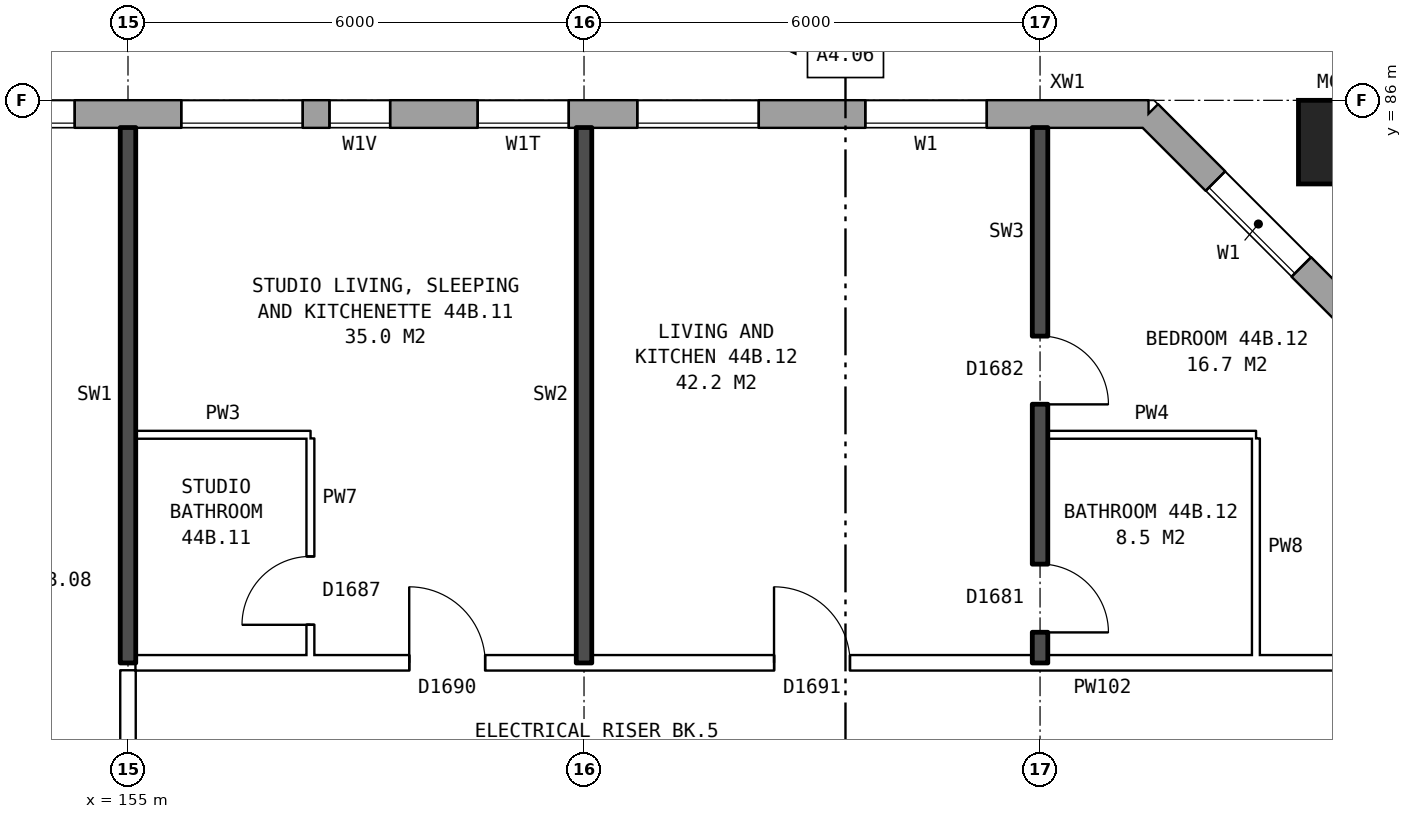
"""IFC4 building model, lengths in metres.
Left out: names, types, materials, properties, quantities, classifications, styles, units other than length and angle.
Written with IfcOpenShell. Run it as: python <this file> out.ifc"""

import sys

from ifc_helpers import new_model, si_unit, direction, frame, frame_2d, origin, origin_2d, place, context, subcontext, project, spatial, rectangle, hollow_rectangle, extrude, element, fill, save


model = new_model("IFC4")
c1 = context("Model", 3, precision=1e-05, world=origin(), true_north=direction((0.0, 1.0)))
c2 = subcontext(c1, "Body", "Model", "MODEL_VIEW")
j1 = project(units=[si_unit("LENGTHUNIT", "METRE"), si_unit("PLANEANGLEUNIT", "RADIAN")], contexts=[c1])
p1 = place(None, origin())
s1 = spatial("IfcSite", under=j1, at=p1, CompositionType="ELEMENT")
p2 = place(p1, origin())
s2 = spatial("IfcBuilding", under=s1, at=p2, CompositionType="ELEMENT")
p3 = place(p2, frame((0.0, 0.0, 157.8)))
s3 = spatial("IfcBuildingStorey", under=s2, at=p3, CompositionType="ELEMENT", Elevation=157.8)
p4 = place(p3, frame((170.95, 85.45, 0.0), z_axis=(0.0, 0.0, 1.0), x_axis=(1.0, 0.0, 0.0)))
e1 = element("IfcColumn", 1, at=p4, inside=s3, PredefinedType="COLUMN", context=c2, shape_type="SweptSolid", body=[
    extrude(hollow_rectangle(XDim=1.1, YDim=1.1, WallThickness=0.06, at=origin_2d()), origin(), (0.0, 0.0, 1.0), 3.1),
])
p5 = place(p3, frame((171.32, 82.925, 0.0), z_axis=(0.0, 0.0, 1.0), x_axis=(-0.707106781187, 0.707106781187, 0.0)))
e2 = element("IfcWall", 2, at=p5, inside=s3, PredefinedType="STANDARD", context=c2, shape_type="SweptSolid", body=[
    extrude(rectangle(XDim=4.094, YDim=0.36, at=frame_2d((2.047, 0.0))), origin(), (0.0, 0.0, 1.0), 2.85),
])
p6 = place(p5, frame((1.247, 0.0, 0.8)))
e3 = element("IfcOpeningElement", 3, at=p6, cuts=e2, PredefinedType="OPENING", context=c2, shape_type="SweptSolid", body=[
    extrude(rectangle(XDim=1.6, YDim=1.8, at=frame_2d((0.8, 0.9))), frame((0.0, 0.19, 0.0), z_axis=(0.0, -1.0, 0.0), x_axis=(1.0, 0.0, 0.0)), (0.0, 0.0, 1.0), 0.38),
])
p7 = place(p3, frame((168.425, 85.82, 0.0), z_axis=(0.0, 0.0, 1.0), x_axis=(-1.0, 0.0, 0.0)))
e4 = element("IfcWall", 4, at=p7, inside=s3, PredefinedType="STANDARD", context=c2, shape_type="SweptSolid", body=[
    extrude(rectangle(XDim=34.351, YDim=0.36, at=frame_2d((17.175, 0.0))), origin(), (0.0, 0.0, 1.0), 2.85),
])
p8 = place(p7, frame((2.125, 0.0, 0.8)))
e5 = element("IfcOpeningElement", 5, at=p8, cuts=e4, PredefinedType="OPENING", context=c2, shape_type="SweptSolid", body=[
    extrude(rectangle(XDim=1.6, YDim=1.8, at=frame_2d((0.8, 0.9))), frame((0.0, 0.19, 0.0), z_axis=(0.0, -1.0, 0.0), x_axis=(1.0, 0.0, 0.0)), (0.0, 0.0, 1.0), 0.38),
])
p9 = place(p7, frame((5.125, 0.0, 0.8)))
e6 = element("IfcOpeningElement", 6, at=p9, cuts=e4, PredefinedType="OPENING", context=c2, shape_type="SweptSolid", body=[
    extrude(rectangle(XDim=1.6, YDim=1.8, at=frame_2d((0.8, 0.9))), frame((0.0, 0.19, 0.0), z_axis=(0.0, -1.0, 0.0), x_axis=(1.0, 0.0, 0.0)), (0.0, 0.0, 1.0), 0.38),
])
p10 = place(p7, frame((7.625, 0.0, 1.7)))
e7 = element("IfcOpeningElement", 7, at=p10, cuts=e4, PredefinedType="OPENING", context=c2, shape_type="SweptSolid", body=[
    extrude(rectangle(XDim=1.2, YDim=0.9, at=frame_2d((0.6, 0.45))), frame((0.0, 0.19, 0.0), z_axis=(0.0, -1.0, 0.0), x_axis=(1.0, 0.0, 0.0)), (0.0, 0.0, 1.0), 0.38),
])
p11 = place(p7, frame((11.125, 0.0, 0.8)))
e8 = element("IfcOpeningElement", 8, at=p11, cuts=e4, PredefinedType="OPENING", context=c2, shape_type="SweptSolid", body=[
    extrude(rectangle(XDim=1.6, YDim=1.8, at=frame_2d((0.8, 0.9))), frame((0.0, 0.19, 0.0), z_axis=(0.0, -1.0, 0.0), x_axis=(1.0, 0.0, 0.0)), (0.0, 0.0, 1.0), 0.38),
])
p12 = place(p7, frame((14.125, 0.0, 0.8)))
e9 = element("IfcOpeningElement", 9, at=p12, cuts=e4, PredefinedType="OPENING", context=c2, shape_type="SweptSolid", body=[
    extrude(rectangle(XDim=1.6, YDim=1.8, at=frame_2d((0.8, 0.9))), frame((0.0, 0.19, 0.0), z_axis=(0.0, -1.0, 0.0), x_axis=(1.0, 0.0, 0.0)), (0.0, 0.0, 1.0), 0.38),
])
p13 = place(p7, frame((17.125, 0.0, 0.8)))
e10 = element("IfcOpeningElement", 10, at=p13, cuts=e4, PredefinedType="OPENING", context=c2, shape_type="SweptSolid", body=[
    extrude(rectangle(XDim=1.6, YDim=1.8, at=frame_2d((0.8, 0.9))), frame((0.0, 0.19, 0.0), z_axis=(0.0, -1.0, 0.0), x_axis=(1.0, 0.0, 0.0)), (0.0, 0.0, 1.0), 0.38),
])
p14 = place(p7, frame((20.125, 0.0, 0.8)))
e11 = element("IfcOpeningElement", 11, at=p14, cuts=e4, PredefinedType="OPENING", context=c2, shape_type="SweptSolid", body=[
    extrude(rectangle(XDim=1.6, YDim=1.8, at=frame_2d((0.8, 0.9))), frame((0.0, 0.19, 0.0), z_axis=(0.0, -1.0, 0.0), x_axis=(1.0, 0.0, 0.0)), (0.0, 0.0, 1.0), 0.38),
])
p15 = place(p7, frame((22.575, 0.0, 0.45)))
e12 = element("IfcOpeningElement", 12, at=p15, cuts=e4, PredefinedType="OPENING", context=c2, shape_type="SweptSolid", body=[
    extrude(rectangle(XDim=1.2, YDim=1.8, at=frame_2d((0.6, 0.9))), frame((0.0, 0.19, 0.0), z_axis=(0.0, -1.0, 0.0), x_axis=(1.0, 0.0, 0.0)), (0.0, 0.0, 1.0), 0.38),
])
p16 = place(p7, frame((25.875, 0.0, 1.4)))
e13 = element("IfcOpeningElement", 13, at=p16, cuts=e4, PredefinedType="OPENING", context=c2, shape_type="SweptSolid", body=[
    extrude(rectangle(XDim=1.0, YDim=1.2, at=frame_2d((0.5, 0.6))), frame((0.0, 0.19, 0.0), z_axis=(0.0, -1.0, 0.0), x_axis=(1.0, 0.0, 0.0)), (0.0, 0.0, 1.0), 0.38),
])
p17 = place(p7, frame((29.125, 0.0, 0.8)))
e14 = element("IfcOpeningElement", 14, at=p17, cuts=e4, PredefinedType="OPENING", context=c2, shape_type="SweptSolid", body=[
    extrude(rectangle(XDim=1.6, YDim=1.8, at=frame_2d((0.8, 0.9))), frame((0.0, 0.19, 0.0), z_axis=(0.0, -1.0, 0.0), x_axis=(1.0, 0.0, 0.0)), (0.0, 0.0, 1.0), 0.38),
])
p18 = place(p7, frame((32.125, 0.0, 0.8)))
e15 = element("IfcOpeningElement", 15, at=p18, cuts=e4, PredefinedType="OPENING", context=c2, shape_type="SweptSolid", body=[
    extrude(rectangle(XDim=1.6, YDim=1.8, at=frame_2d((0.8, 0.9))), frame((0.0, 0.19, 0.0), z_axis=(0.0, -1.0, 0.0), x_axis=(1.0, 0.0, 0.0)), (0.0, 0.0, 1.0), 0.38),
])
p19 = place(p7, frame((9.975, 0.0, 0.8)))
e16 = element("IfcOpeningElement", 16, at=p19, cuts=e4, PredefinedType="OPENING", context=c2, shape_type="SweptSolid", body=[
    extrude(rectangle(XDim=0.8, YDim=0.9, at=frame_2d((0.4, 0.45))), frame((0.0, 0.19, 0.0), z_axis=(0.0, -1.0, 0.0), x_axis=(1.0, 0.0, 0.0)), (0.0, 0.0, 1.0), 0.38),
])
p20 = place(p7, frame((24.075, 0.0, 0.35)))
e17 = element("IfcOpeningElement", 17, at=p20, cuts=e4, PredefinedType="OPENING", context=c2, shape_type="SweptSolid", body=[
    extrude(rectangle(XDim=0.8, YDim=0.9, at=frame_2d((0.4, 0.45))), frame((0.0, 0.19, 0.0), z_axis=(0.0, -1.0, 0.0), x_axis=(1.0, 0.0, 0.0)), (0.0, 0.0, 1.0), 0.38),
])
p21 = place(p7, frame((27.175, 0.0, 0.8)))
e18 = element("IfcOpeningElement", 18, at=p21, cuts=e4, PredefinedType="OPENING", context=c2, shape_type="SweptSolid", body=[
    extrude(rectangle(XDim=1.4, YDim=1.8, at=frame_2d((0.7, 0.9))), frame((0.0, 0.19, 0.0), z_axis=(0.0, -1.0, 0.0), x_axis=(1.0, 0.0, 0.0)), (0.0, 0.0, 1.0), 0.38),
])
p22 = place(p3, frame((155.1, 78.6, 0.0), z_axis=(0.0, 0.0, 1.0), x_axis=(1.0, 0.0, 0.0)))
e19 = element("IfcWall", 19, at=p22, inside=s3, PredefinedType="PARTITIONING", context=c2, shape_type="SweptSolid", body=[
    extrude(rectangle(XDim=16.04, YDim=0.2, at=frame_2d((8.02, 0.0))), origin(), (0.0, 0.0, 1.0), 2.85),
])
p23 = place(p22, frame((3.6, 0.0, 0.0)))
e20 = element("IfcOpeningElement", 20, at=p23, cuts=e19, PredefinedType="OPENING", context=c2, shape_type="SweptSolid", body=[
    extrude(rectangle(XDim=1.0, YDim=2.1, at=frame_2d((0.5, 1.05))), frame((0.0, 0.11, 0.0), z_axis=(0.0, -1.0, 0.0), x_axis=(1.0, 0.0, 0.0)), (0.0, 0.0, 1.0), 0.22),
])
p24 = place(p22, frame((8.4, 0.0, 0.0)))
e21 = element("IfcOpeningElement", 21, at=p24, cuts=e19, PredefinedType="OPENING", context=c2, shape_type="SweptSolid", body=[
    extrude(rectangle(XDim=1.0, YDim=2.1, at=frame_2d((0.5, 1.05))), frame((0.0, 0.11, 0.0), z_axis=(0.0, -1.0, 0.0), x_axis=(1.0, 0.0, 0.0)), (0.0, 0.0, 1.0), 0.22),
])
p25 = place(p3, frame((155.1, 81.6, 0.0), z_axis=(0.0, 0.0, 1.0), x_axis=(1.0, 0.0, 0.0)))
e22 = element("IfcWall", 22, at=p25, inside=s3, PredefinedType="PARTITIONING", context=c2, shape_type="SweptSolid", body=[
    extrude(rectangle(XDim=2.3, YDim=0.1, at=frame_2d((1.15, 0.0))), origin(), (0.0, 0.0, 1.0), 2.85),
])
p26 = place(p3, frame((167.1, 81.6, 0.0), z_axis=(0.0, 0.0, 1.0), x_axis=(1.0, 0.0, 0.0)))
e23 = element("IfcWall", 23, at=p26, inside=s3, PredefinedType="PARTITIONING", context=c2, shape_type="SweptSolid", body=[
    extrude(rectangle(XDim=2.74, YDim=0.1, at=frame_2d((1.37, 0.0))), origin(), (0.0, 0.0, 1.0), 2.85),
])
p27 = place(p3, frame((155.0, 76.3, 0.0), z_axis=(0.0, 0.0, 1.0), x_axis=(0.0, 1.0, 0.0)))
e24 = element("IfcWall", 24, at=p27, inside=s3, PredefinedType="PARTITIONING", context=c2, shape_type="SweptSolid", body=[
    extrude(rectangle(XDim=2.2, YDim=0.2, at=frame_2d((1.1, 0.0))), origin(), (0.0, 0.0, 1.0), 2.85),
])
p28 = place(p3, frame((155.0, 78.6, 0.0), z_axis=(0.0, 0.0, 1.0), x_axis=(0.0, 1.0, 0.0)))
e25 = element("IfcWall", 25, at=p28, inside=s3, PredefinedType="SOLIDWALL", context=c2, shape_type="SweptSolid", body=[
    extrude(rectangle(XDim=7.04, YDim=0.2, at=frame_2d((3.52, 0.0))), origin(), (0.0, 0.0, 1.0), 2.85),
])
p29 = place(p3, frame((157.4, 78.7, 0.0), z_axis=(0.0, 0.0, 1.0), x_axis=(0.0, 1.0, 0.0)))
e26 = element("IfcWall", 26, at=p29, inside=s3, PredefinedType="PARTITIONING", context=c2, shape_type="SweptSolid", body=[
    extrude(rectangle(XDim=2.85, YDim=0.1, at=frame_2d((1.425, 0.0))), origin(), (0.0, 0.0, 1.0), 2.85),
])
p30 = place(p29, frame((0.4, 0.0, 0.0)))
e27 = element("IfcOpeningElement", 27, at=p30, cuts=e26, PredefinedType="OPENING", context=c2, shape_type="SweptSolid", body=[
    extrude(rectangle(XDim=0.9, YDim=2.1, at=frame_2d((0.45, 1.05))), frame((0.0, 0.06, 0.0), z_axis=(0.0, -1.0, 0.0), x_axis=(1.0, 0.0, 0.0)), (0.0, 0.0, 1.0), 0.12),
])
p31 = place(p3, frame((161.0, 78.6, 0.0), z_axis=(0.0, 0.0, 1.0), x_axis=(0.0, 1.0, 0.0)))
e28 = element("IfcWall", 28, at=p31, inside=s3, PredefinedType="SOLIDWALL", context=c2, shape_type="SweptSolid", body=[
    extrude(rectangle(XDim=7.04, YDim=0.2, at=frame_2d((3.52, 0.0))), origin(), (0.0, 0.0, 1.0), 2.85),
])
p32 = place(p3, frame((167.0, 78.6, 0.0), z_axis=(0.0, 0.0, 1.0), x_axis=(0.0, 1.0, 0.0)))
e29 = element("IfcWall", 29, at=p32, inside=s3, PredefinedType="SOLIDWALL", context=c2, shape_type="SweptSolid", body=[
    extrude(rectangle(XDim=7.04, YDim=0.2, at=frame_2d((3.52, 0.0))), origin(), (0.0, 0.0, 1.0), 2.85),
])
p33 = place(p32, frame((3.4, 0.0, 0.0)))
e30 = element("IfcOpeningElement", 30, at=p33, cuts=e29, PredefinedType="OPENING", context=c2, shape_type="SweptSolid", body=[
    extrude(rectangle(XDim=0.9, YDim=2.1, at=frame_2d((0.45, 1.05))), frame((0.0, 0.11, 0.0), z_axis=(0.0, -1.0, 0.0), x_axis=(1.0, 0.0, 0.0)), (0.0, 0.0, 1.0), 0.22),
])
p34 = place(p32, frame((0.4, 0.0, 0.0)))
e31 = element("IfcOpeningElement", 31, at=p34, cuts=e29, PredefinedType="OPENING", context=c2, shape_type="SweptSolid", body=[
    extrude(rectangle(XDim=0.9, YDim=2.1, at=frame_2d((0.45, 1.05))), frame((0.0, 0.11, 0.0), z_axis=(0.0, -1.0, 0.0), x_axis=(1.0, 0.0, 0.0)), (0.0, 0.0, 1.0), 0.22),
])
p35 = place(p3, frame((169.84, 78.7, 0.0), z_axis=(0.0, 0.0, 1.0), x_axis=(0.0, 1.0, 0.0)))
e32 = element("IfcWall", 32, at=p35, inside=s3, PredefinedType="PARTITIONING", context=c2, shape_type="SweptSolid", body=[
    extrude(rectangle(XDim=2.85, YDim=0.1, at=frame_2d((1.425, 0.0))), origin(), (0.0, 0.0, 1.0), 2.85),
])
p36 = place(p6, origin())
e33 = element("IfcWindow", 33, at=p36, inside=s3, PartitioningType="SINGLE_PANEL", PredefinedType="WINDOW", context=c2, shape_type="SweptSolid", body=[
    extrude(rectangle(XDim=1.6, YDim=1.8, at=frame_2d((0.8, 0.9))), frame((0.0, 0.15, 0.0), z_axis=(0.0, -1.0, 0.0), x_axis=(1.0, 0.0, 0.0)), (0.0, 0.0, 1.0), 0.06),
])
fill(e3, e33)
p37 = place(p8, origin())
e34 = element("IfcWindow", 34, at=p37, inside=s3, PartitioningType="SINGLE_PANEL", PredefinedType="WINDOW", context=c2, shape_type="SweptSolid", body=[
    extrude(rectangle(XDim=1.6, YDim=1.8, at=frame_2d((0.8, 0.9))), frame((0.0, 0.15, 0.0), z_axis=(0.0, -1.0, 0.0), x_axis=(1.0, 0.0, 0.0)), (0.0, 0.0, 1.0), 0.06),
])
fill(e5, e34)
p38 = place(p9, origin())
e35 = element("IfcWindow", 35, at=p38, inside=s3, PartitioningType="SINGLE_PANEL", PredefinedType="WINDOW", context=c2, shape_type="SweptSolid", body=[
    extrude(rectangle(XDim=1.6, YDim=1.8, at=frame_2d((0.8, 0.9))), frame((0.0, 0.15, 0.0), z_axis=(0.0, -1.0, 0.0), x_axis=(1.0, 0.0, 0.0)), (0.0, 0.0, 1.0), 0.06),
])
fill(e6, e35)
p39 = place(p10, origin())
e36 = element("IfcWindow", 36, at=p39, inside=s3, PartitioningType="SINGLE_PANEL", PredefinedType="WINDOW", context=c2, shape_type="SweptSolid", body=[
    extrude(rectangle(XDim=1.2, YDim=0.9, at=frame_2d((0.6, 0.45))), frame((0.0, 0.15, 0.0), z_axis=(0.0, -1.0, 0.0), x_axis=(1.0, 0.0, 0.0)), (0.0, 0.0, 1.0), 0.06),
])
fill(e7, e36)
p40 = place(p11, origin())
e37 = element("IfcWindow", 37, at=p40, inside=s3, PartitioningType="SINGLE_PANEL", PredefinedType="WINDOW", context=c2, shape_type="SweptSolid", body=[
    extrude(rectangle(XDim=1.6, YDim=1.8, at=frame_2d((0.8, 0.9))), frame((0.0, 0.15, 0.0), z_axis=(0.0, -1.0, 0.0), x_axis=(1.0, 0.0, 0.0)), (0.0, 0.0, 1.0), 0.06),
])
fill(e8, e37)
p41 = place(p12, origin())
e38 = element("IfcWindow", 38, at=p41, inside=s3, PartitioningType="SINGLE_PANEL", PredefinedType="WINDOW", context=c2, shape_type="SweptSolid", body=[
    extrude(rectangle(XDim=1.6, YDim=1.8, at=frame_2d((0.8, 0.9))), frame((0.0, 0.15, 0.0), z_axis=(0.0, -1.0, 0.0), x_axis=(1.0, 0.0, 0.0)), (0.0, 0.0, 1.0), 0.06),
])
fill(e9, e38)
p42 = place(p23, origin())
e39 = element("IfcDoor", 39, at=p42, inside=s3, OperationType="SINGLE_SWING_LEFT", PredefinedType="DOOR", context=c2, shape_type="SweptSolid", body=[
    extrude(rectangle(XDim=1.0, YDim=2.1, at=frame_2d((0.5, 1.05))), frame((0.0, 0.025, 0.0), z_axis=(0.0, -1.0, 0.0), x_axis=(1.0, 0.0, 0.0)), (0.0, 0.0, 1.0), 0.05),
])
fill(e20, e39)
p43 = place(p30, origin())
e40 = element("IfcDoor", 40, at=p43, inside=s3, OperationType="SINGLE_SWING_LEFT", PredefinedType="DOOR", context=c2, shape_type="SweptSolid", body=[
    extrude(rectangle(XDim=0.9, YDim=2.1, at=frame_2d((0.45, 1.05))), frame((0.0, 0.025, 0.0), z_axis=(0.0, -1.0, 0.0), x_axis=(1.0, 0.0, 0.0)), (0.0, 0.0, 1.0), 0.05),
])
fill(e27, e40)
p44 = place(p33, frame((0.9, 0.0, 0.0), z_axis=(0.0, 0.0, 1.0), x_axis=(-1.0, 0.0, 0.0)))
e41 = element("IfcDoor", 41, at=p44, inside=s3, OperationType="SINGLE_SWING_RIGHT", PredefinedType="DOOR", context=c2, shape_type="SweptSolid", body=[
    extrude(rectangle(XDim=0.9, YDim=2.1, at=frame_2d((0.45, 1.05))), frame((0.0, 0.025, 0.0), z_axis=(0.0, -1.0, 0.0), x_axis=(1.0, 0.0, 0.0)), (0.0, 0.0, 1.0), 0.05),
])
fill(e30, e41)
p45 = place(p24, origin())
e42 = element("IfcDoor", 42, at=p45, inside=s3, OperationType="SINGLE_SWING_LEFT", PredefinedType="DOOR", context=c2, shape_type="SweptSolid", body=[
    extrude(rectangle(XDim=1.0, YDim=2.1, at=frame_2d((0.5, 1.05))), frame((0.0, 0.025, 0.0), z_axis=(0.0, -1.0, 0.0), x_axis=(1.0, 0.0, 0.0)), (0.0, 0.0, 1.0), 0.05),
])
fill(e21, e42)
p46 = place(p34, frame((0.9, 0.0, 0.0), z_axis=(0.0, 0.0, 1.0), x_axis=(-1.0, 0.0, 0.0)))
e43 = element("IfcDoor", 43, at=p46, inside=s3, OperationType="SINGLE_SWING_RIGHT", PredefinedType="DOOR", context=c2, shape_type="SweptSolid", body=[
    extrude(rectangle(XDim=0.9, YDim=2.1, at=frame_2d((0.45, 1.05))), frame((0.0, 0.025, 0.0), z_axis=(0.0, -1.0, 0.0), x_axis=(1.0, 0.0, 0.0)), (0.0, 0.0, 1.0), 0.05),
])
fill(e31, e43)
p47 = place(p19, origin())
e44 = element("IfcWindow", 44, at=p47, inside=s3, PartitioningType="SINGLE_PANEL", PredefinedType="WINDOW", context=c2, shape_type="SweptSolid", body=[
    extrude(rectangle(XDim=0.8, YDim=0.9, at=frame_2d((0.4, 0.45))), frame((0.0, 0.15, 0.0), z_axis=(0.0, -1.0, 0.0), x_axis=(1.0, 0.0, 0.0)), (0.0, 0.0, 1.0), 0.06),
])
fill(e16, e44)
save(model, sys.argv[1])
